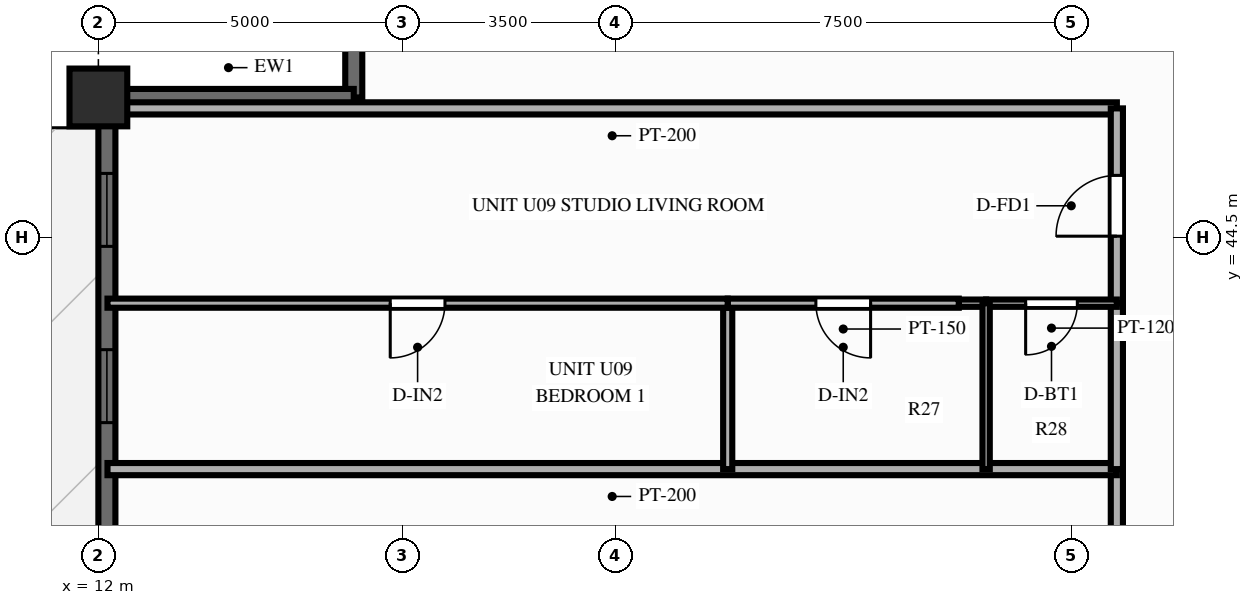
"""IFC4 building model, lengths in metres.
Left out: names, types, materials, properties, quantities, classifications, styles, units other than length and angle.
Written with IfcOpenShell. Run it as: python <this file> out.ifc"""

import sys

from ifc_helpers import new_model, si_unit, direction, frame, frame_2d, origin, origin_2d, place, context, subcontext, project, spatial, rectangle, extrude, source, transform, mapped, element, fill, save


model = new_model("IFC4")
c1 = context("Model", 3, precision=1e-05, world=origin(), true_north=direction((0.0, 1.0)))
c2 = subcontext(c1, "Body", "Model", "MODEL_VIEW")
j1 = project(units=[si_unit("LENGTHUNIT", "METRE"), si_unit("PLANEANGLEUNIT", "RADIAN")], contexts=[c1])
p1 = place(None, origin())
s1 = spatial("IfcSite", under=j1, at=p1, CompositionType="ELEMENT")
p2 = place(p1, origin())
s2 = spatial("IfcBuilding", under=s1, at=p2, CompositionType="ELEMENT")
p3 = place(p2, frame((0.0, 0.0, 119.85)))
s3 = spatial("IfcBuildingStorey", under=s2, at=p3, CompositionType="ELEMENT", Elevation=119.85)
m1 = source(origin(), c2, "Body", "SweptSolid", [
    extrude(rectangle(XDim=0.95, YDim=0.95, at=origin_2d()), origin(), (0.0, 0.0, 1.0), 3.0),
])
p4 = place(p3, frame((12.0, 46.8, 0.0), z_axis=(0.0, 0.0, 1.0), x_axis=(1.0, 0.0, 0.0)))
e1 = element("IfcColumn", 1, at=p4, inside=s3, PredefinedType="COLUMN", context=c2, shape_type="MappedRepresentation", body=[
    mapped(m1, transform((0.0, 0.0, 0.0), scale=1.0)),
])
p5 = place(p3, frame((12.14, 7.2, 0.0), z_axis=(0.0, 0.0, 1.0), x_axis=(0.0, 1.0, 0.0)))
e2 = element("IfcWall", 2, at=p5, inside=s3, PredefinedType="SOLIDWALL", context=c2, shape_type="SweptSolid", body=[
    extrude(rectangle(XDim=39.6, YDim=0.28, at=frame_2d((19.8, 0.0))), origin(), (0.0, 0.0, 1.0), 2.28),
])
p6 = place(p5, frame((0.945, 0.0, 0.25)))
e3 = element("IfcOpeningElement", 3, at=p6, cuts=e2, PredefinedType="OPENING", context=c2, shape_type="SweptSolid", body=[
    extrude(rectangle(XDim=1.2, YDim=1.5, at=frame_2d((0.6, 0.75))), frame((0.0, 0.152, 0.0), z_axis=(0.0, -1.0, 0.0), x_axis=(1.0, 0.0, 0.0)), (0.0, 0.0, 1.0), 0.304),
])
p7 = place(p5, frame((4.213, 0.0, 0.25)))
e4 = element("IfcOpeningElement", 4, at=p7, cuts=e2, PredefinedType="OPENING", context=c2, shape_type="SweptSolid", body=[
    extrude(rectangle(XDim=1.2, YDim=1.5, at=frame_2d((0.6, 0.75))), frame((0.0, 0.152, 0.0), z_axis=(0.0, -1.0, 0.0), x_axis=(1.0, 0.0, 0.0)), (0.0, 0.0, 1.0), 0.304),
])
p8 = place(p5, frame((7.55, 0.0, 0.25)))
e5 = element("IfcOpeningElement", 5, at=p8, cuts=e2, PredefinedType="OPENING", context=c2, shape_type="SweptSolid", body=[
    extrude(rectangle(XDim=1.2, YDim=1.5, at=frame_2d((0.6, 0.75))), frame((0.0, 0.152, 0.0), z_axis=(0.0, -1.0, 0.0), x_axis=(1.0, 0.0, 0.0)), (0.0, 0.0, 1.0), 0.304),
])
p9 = place(p5, frame((13.483, 0.0, 0.25)))
e6 = element("IfcOpeningElement", 6, at=p9, cuts=e2, PredefinedType="OPENING", context=c2, shape_type="SweptSolid", body=[
    extrude(rectangle(XDim=1.2, YDim=1.5, at=frame_2d((0.6, 0.75))), frame((0.0, 0.152, 0.0), z_axis=(0.0, -1.0, 0.0), x_axis=(1.0, 0.0, 0.0)), (0.0, 0.0, 1.0), 0.304),
])
p10 = place(p5, frame((16.82, 0.0, 0.25)))
e7 = element("IfcOpeningElement", 7, at=p10, cuts=e2, PredefinedType="OPENING", context=c2, shape_type="SweptSolid", body=[
    extrude(rectangle(XDim=1.2, YDim=1.5, at=frame_2d((0.6, 0.75))), frame((0.0, 0.152, 0.0), z_axis=(0.0, -1.0, 0.0), x_axis=(1.0, 0.0, 0.0)), (0.0, 0.0, 1.0), 0.304),
])
p11 = place(p5, frame((19.2, 0.0, 0.25)))
e8 = element("IfcOpeningElement", 8, at=p11, cuts=e2, PredefinedType="OPENING", context=c2, shape_type="SweptSolid", body=[
    extrude(rectangle(XDim=1.2, YDim=1.5, at=frame_2d((0.6, 0.75))), frame((0.0, 0.152, 0.0), z_axis=(0.0, -1.0, 0.0), x_axis=(1.0, 0.0, 0.0)), (0.0, 0.0, 1.0), 0.304),
])
p12 = place(p5, frame((21.992, 0.0, 0.0)))
e9 = element("IfcOpeningElement", 9, at=p12, cuts=e2, PredefinedType="OPENING", context=c2, shape_type="SweptSolid", body=[
    extrude(rectangle(XDim=1.6, YDim=2.15, at=frame_2d((0.8, 1.075))), frame((0.0, 0.152, 0.0), z_axis=(0.0, -1.0, 0.0), x_axis=(1.0, 0.0, 0.0)), (0.0, 0.0, 1.0), 0.304),
])
p13 = place(p5, frame((25.529, 0.0, 0.25)))
e10 = element("IfcOpeningElement", 10, at=p13, cuts=e2, PredefinedType="OPENING", context=c2, shape_type="SweptSolid", body=[
    extrude(rectangle(XDim=1.2, YDim=1.5, at=frame_2d((0.6, 0.75))), frame((0.0, 0.152, 0.0), z_axis=(0.0, -1.0, 0.0), x_axis=(1.0, 0.0, 0.0)), (0.0, 0.0, 1.0), 0.304),
])
p14 = place(p5, frame((29.349, 0.0, 0.25)))
e11 = element("IfcOpeningElement", 11, at=p14, cuts=e2, PredefinedType="OPENING", context=c2, shape_type="SweptSolid", body=[
    extrude(rectangle(XDim=0.7, YDim=1.5, at=frame_2d((0.35, 0.75))), frame((0.0, 0.152, 0.0), z_axis=(0.0, -1.0, 0.0), x_axis=(1.0, 0.0, 0.0)), (0.0, 0.0, 1.0), 0.304),
])
p15 = place(p5, frame((31.285, 0.0, 0.25)))
e12 = element("IfcOpeningElement", 12, at=p15, cuts=e2, PredefinedType="OPENING", context=c2, shape_type="SweptSolid", body=[
    extrude(rectangle(XDim=1.2, YDim=1.5, at=frame_2d((0.6, 0.75))), frame((0.0, 0.152, 0.0), z_axis=(0.0, -1.0, 0.0), x_axis=(1.0, 0.0, 0.0)), (0.0, 0.0, 1.0), 0.304),
])
p16 = place(p5, frame((34.252, 0.0, 0.25)))
e13 = element("IfcOpeningElement", 13, at=p16, cuts=e2, PredefinedType="OPENING", context=c2, shape_type="SweptSolid", body=[
    extrude(rectangle(XDim=1.2, YDim=1.5, at=frame_2d((0.6, 0.75))), frame((0.0, 0.152, 0.0), z_axis=(0.0, -1.0, 0.0), x_axis=(1.0, 0.0, 0.0)), (0.0, 0.0, 1.0), 0.304),
])
p17 = place(p5, frame((37.151, 0.0, 0.25)))
e14 = element("IfcOpeningElement", 14, at=p17, cuts=e2, PredefinedType="OPENING", context=c2, shape_type="SweptSolid", body=[
    extrude(rectangle(XDim=1.2, YDim=1.5, at=frame_2d((0.6, 0.75))), frame((0.0, 0.152, 0.0), z_axis=(0.0, -1.0, 0.0), x_axis=(1.0, 0.0, 0.0)), (0.0, 0.0, 1.0), 0.304),
])
for number, where, z_axis, x_axis in (
    (15, (16.2, 46.8, 0.0), (0.0, 0.0, 1.0), (0.0, 1.0, 0.0)),
    (16, (12.08, 46.8, 0.0), (0.0, 0.0, 1.0), (1.0, 0.0, 0.0)),
):
    element("IfcWall", number, at=place(p3, frame(where, z_axis=z_axis, x_axis=x_axis)), inside=s3, PredefinedType="SOLIDWALL", context=c2, shape_type="SweptSolid", body=[
        extrude(rectangle(XDim=4.12, YDim=0.28, at=frame_2d((2.06, 0.0))), origin(), (0.0, 0.0, 1.0), 2.28),
    ])
p18 = place(p3, frame((28.75, 46.62, 0.0), z_axis=(0.0, 0.0, 1.0), x_axis=(-1.0, 0.0, 0.0)))
e17 = element("IfcWall", 17, at=p18, inside=s3, PredefinedType="PARTITIONING", context=c2, shape_type="SweptSolid", body=[
    extrude(rectangle(XDim=16.6, YDim=0.2, at=frame_2d((8.3, 0.0))), origin(), (0.0, 0.0, 1.0), 2.79),
])
p19 = place(p3, frame((28.75, 37.483, 0.0), z_axis=(0.0, 0.0, 1.0), x_axis=(0.0, 1.0, 0.0)))
e18 = element("IfcWall", 18, at=p19, inside=s3, PredefinedType="PARTITIONING", context=c2, shape_type="SweptSolid", body=[
    extrude(rectangle(XDim=3.204, YDim=0.2, at=frame_2d((1.602, 0.0))), origin(), (0.0, 0.0, 1.0), 2.79),
])
p20 = place(p19, frame((1.102, 0.0, 0.0)))
e19 = element("IfcOpeningElement", 19, at=p20, cuts=e18, PredefinedType="OPENING", context=c2, shape_type="SweptSolid", body=[
    extrude(rectangle(XDim=1.0, YDim=2.15, at=frame_2d((0.5, 1.075))), frame((0.0, 0.112, 0.0), z_axis=(0.0, -1.0, 0.0), x_axis=(1.0, 0.0, 0.0)), (0.0, 0.0, 1.0), 0.224),
])
p21 = place(p3, frame((28.75, 40.687, 0.0), z_axis=(0.0, 0.0, 1.0), x_axis=(-1.0, 0.0, 0.0)))
e20 = element("IfcWall", 20, at=p21, inside=s3, PredefinedType="PARTITIONING", context=c2, shape_type="SweptSolid", body=[
    extrude(rectangle(XDim=16.6, YDim=0.2, at=frame_2d((8.3, 0.0))), origin(), (0.0, 0.0, 1.0), 2.79),
])
p22 = place(p3, frame((28.75, 40.687, 0.0), z_axis=(0.0, 0.0, 1.0), x_axis=(0.0, 1.0, 0.0)))
e21 = element("IfcWall", 21, at=p22, inside=s3, PredefinedType="PARTITIONING", context=c2, shape_type="SweptSolid", body=[
    extrude(rectangle(XDim=2.729, YDim=0.2, at=frame_2d((1.365, 0.0))), origin(), (0.0, 0.0, 1.0), 2.79),
])
p23 = place(p3, frame((28.75, 43.416, 0.0), z_axis=(0.0, 0.0, 1.0), x_axis=(0.0, 1.0, 0.0)))
e22 = element("IfcWall", 22, at=p23, inside=s3, PredefinedType="PARTITIONING", context=c2, shape_type="SweptSolid", body=[
    extrude(rectangle(XDim=3.204, YDim=0.2, at=frame_2d((1.602, 0.0))), origin(), (0.0, 0.0, 1.0), 2.79),
])
p24 = place(p23, frame((1.102, 0.0, 0.0)))
e23 = element("IfcOpeningElement", 23, at=p24, cuts=e22, PredefinedType="OPENING", context=c2, shape_type="SweptSolid", body=[
    extrude(rectangle(XDim=1.0, YDim=2.15, at=frame_2d((0.5, 1.075))), frame((0.0, 0.112, 0.0), z_axis=(0.0, -1.0, 0.0), x_axis=(1.0, 0.0, 0.0)), (0.0, 0.0, 1.0), 0.224),
])
p25 = place(p3, frame((28.75, 43.416, 0.0), z_axis=(0.0, 0.0, 1.0), x_axis=(-1.0, 0.0, 0.0)))
e24 = element("IfcWall", 24, at=p25, inside=s3, PredefinedType="PARTITIONING", context=c2, shape_type="SweptSolid", body=[
    extrude(rectangle(XDim=2.15, YDim=0.12, at=frame_2d((1.075, 0.0))), origin(), (0.0, 0.0, 1.0), 2.79),
])
p26 = place(p25, frame((0.65, 0.0, 0.0)))
e25 = element("IfcOpeningElement", 25, at=p26, cuts=e24, PredefinedType="OPENING", context=c2, shape_type="SweptSolid", body=[
    extrude(rectangle(XDim=0.85, YDim=2.05, at=frame_2d((0.425, 1.025))), frame((0.0, 0.072, 0.0), z_axis=(0.0, -1.0, 0.0), x_axis=(1.0, 0.0, 0.0)), (0.0, 0.0, 1.0), 0.144),
])
p27 = place(p3, frame((26.6, 43.416, 0.0), z_axis=(0.0, 0.0, 1.0), x_axis=(-1.0, 0.0, 0.0)))
e26 = element("IfcWall", 26, at=p27, inside=s3, PredefinedType="PARTITIONING", context=c2, shape_type="SweptSolid", body=[
    extrude(rectangle(XDim=0.45, YDim=0.12, at=frame_2d((0.225, 0.0))), origin(), (0.0, 0.0, 1.0), 2.79),
])
p28 = place(p3, frame((26.6, 40.687, 0.0), z_axis=(0.0, 0.0, 1.0), x_axis=(0.0, 1.0, 0.0)))
e27 = element("IfcWall", 27, at=p28, inside=s3, PredefinedType="PARTITIONING", context=c2, shape_type="SweptSolid", body=[
    extrude(rectangle(XDim=2.729, YDim=0.12, at=frame_2d((1.365, 0.0))), origin(), (0.0, 0.0, 1.0), 2.79),
])
p29 = place(p3, frame((22.35, 40.687, 0.0), z_axis=(0.0, 0.0, 1.0), x_axis=(0.0, 1.0, 0.0)))
e28 = element("IfcWall", 28, at=p29, inside=s3, PredefinedType="PARTITIONING", context=c2, shape_type="SweptSolid", body=[
    extrude(rectangle(XDim=2.729, YDim=0.15, at=frame_2d((1.365, 0.0))), origin(), (0.0, 0.0, 1.0), 2.79),
])
p30 = place(p3, frame((26.15, 43.416, 0.0), z_axis=(0.0, 0.0, 1.0), x_axis=(-1.0, 0.0, 0.0)))
e29 = element("IfcWall", 29, at=p30, inside=s3, PredefinedType="PARTITIONING", context=c2, shape_type="SweptSolid", body=[
    extrude(rectangle(XDim=3.8, YDim=0.15, at=frame_2d((1.9, 0.0))), origin(), (0.0, 0.0, 1.0), 2.79),
])
p31 = place(p30, frame((1.45, 0.0, 0.0)))
e30 = element("IfcOpeningElement", 30, at=p31, cuts=e29, PredefinedType="OPENING", context=c2, shape_type="SweptSolid", body=[
    extrude(rectangle(XDim=0.9, YDim=2.1, at=frame_2d((0.45, 1.05))), frame((0.0, 0.087, 0.0), z_axis=(0.0, -1.0, 0.0), x_axis=(1.0, 0.0, 0.0)), (0.0, 0.0, 1.0), 0.174),
])
p32 = place(p3, frame((22.35, 43.416, 0.0), z_axis=(0.0, 0.0, 1.0), x_axis=(-1.0, 0.0, 0.0)))
e31 = element("IfcWall", 31, at=p32, inside=s3, PredefinedType="PARTITIONING", context=c2, shape_type="SweptSolid", body=[
    extrude(rectangle(XDim=10.2, YDim=0.15, at=frame_2d((5.1, 0.0))), origin(), (0.0, 0.0, 1.0), 2.79),
])
p33 = place(p32, frame((4.65, 0.0, 0.0)))
e32 = element("IfcOpeningElement", 32, at=p33, cuts=e31, PredefinedType="OPENING", context=c2, shape_type="SweptSolid", body=[
    extrude(rectangle(XDim=0.9, YDim=2.1, at=frame_2d((0.45, 1.05))), frame((0.0, 0.087, 0.0), z_axis=(0.0, -1.0, 0.0), x_axis=(1.0, 0.0, 0.0)), (0.0, 0.0, 1.0), 0.174),
])
m2 = source(origin(), c2, "Body", "SweptSolid", [
    extrude(rectangle(XDim=1.2, YDim=1.5, at=frame_2d((0.6, 0.75))), frame((0.0, 0.03, 0.0), z_axis=(0.0, -1.0, 0.0), x_axis=(1.0, 0.0, 0.0)), (0.0, 0.0, 1.0), 0.06),
])
p34 = place(p16, origin())
e33 = element("IfcWindow", 33, at=p34, inside=s3, PartitioningType="SINGLE_PANEL", PredefinedType="WINDOW", context=c2, shape_type="MappedRepresentation", body=[
    mapped(m2, transform((0.0, 0.0, 0.0), scale=1.0)),
])
fill(e13, e33)
p35 = place(p17, origin())
e34 = element("IfcWindow", 34, at=p35, inside=s3, PartitioningType="SINGLE_PANEL", PredefinedType="WINDOW", context=c2, shape_type="MappedRepresentation", body=[
    mapped(m2, transform((0.0, 0.0, 0.0), scale=1.0)),
])
fill(e14, e34)
m3 = source(origin(), c2, "Body", "SweptSolid", [
    extrude(rectangle(XDim=1.0, YDim=2.15, at=frame_2d((0.5, 1.075))), frame((0.0, 0.025, 0.0), z_axis=(0.0, -1.0, 0.0), x_axis=(1.0, 0.0, 0.0)), (0.0, 0.0, 1.0), 0.05),
])
p36 = place(p24, origin())
e35 = element("IfcDoor", 35, at=p36, inside=s3, OperationType="SINGLE_SWING_LEFT", PredefinedType="DOOR", context=c2, shape_type="MappedRepresentation", body=[
    mapped(m3, transform((0.0, 0.0, 0.0), scale=1.0)),
])
fill(e23, e35)
m4 = source(origin(), c2, "Body", "SweptSolid", [
    extrude(rectangle(XDim=0.85, YDim=2.05, at=frame_2d((0.425, 1.025))), frame((0.0, 0.025, 0.0), z_axis=(0.0, -1.0, 0.0), x_axis=(1.0, 0.0, 0.0)), (0.0, 0.0, 1.0), 0.05),
])
p37 = place(p26, origin())
e36 = element("IfcDoor", 36, at=p37, inside=s3, OperationType="SINGLE_SWING_RIGHT", PredefinedType="DOOR", context=c2, shape_type="MappedRepresentation", body=[
    mapped(m4, transform((0.0, 0.0, 0.0), scale=1.0)),
])
fill(e25, e36)
m5 = source(origin(), c2, "Body", "SweptSolid", [
    extrude(rectangle(XDim=0.9, YDim=2.1, at=frame_2d((0.45, 1.05))), frame((0.0, 0.025, 0.0), z_axis=(0.0, -1.0, 0.0), x_axis=(1.0, 0.0, 0.0)), (0.0, 0.0, 1.0), 0.05),
])
p38 = place(p31, origin())
e37 = element("IfcDoor", 37, at=p38, inside=s3, OperationType="SINGLE_SWING_LEFT", PredefinedType="DOOR", context=c2, shape_type="MappedRepresentation", body=[
    mapped(m5, transform((0.0, 0.0, 0.0), scale=1.0)),
])
fill(e30, e37)
p39 = place(p33, origin())
e38 = element("IfcDoor", 38, at=p39, inside=s3, OperationType="SINGLE_SWING_RIGHT", PredefinedType="DOOR", context=c2, shape_type="MappedRepresentation", body=[
    mapped(m5, transform((0.0, 0.0, 0.0), scale=1.0)),
])
fill(e32, e38)
save(model, sys.argv[1])
